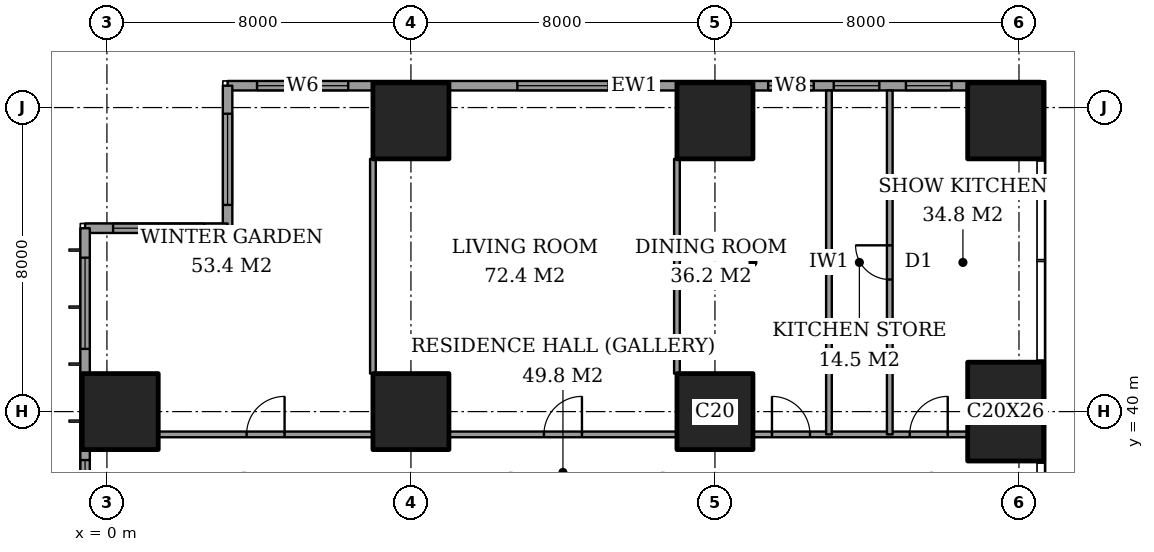
"""IFC4 building model, lengths in metres.
Left out: names, types, materials, properties, quantities, classifications, styles, units other than length and angle.
Written with IfcOpenShell. Run it as: python <this file> out.ifc"""

import sys

from ifc_helpers import new_model, si_unit, direction, frame, frame_2d, origin, origin_2d, place, context, subcontext, project, spatial, rectangle, extrude, element, fill, save


model = new_model("IFC4")
c1 = context("Model", 3, precision=1e-05, world=origin(), true_north=direction((0.0, 1.0)))
c2 = subcontext(c1, "Body", "Model", "MODEL_VIEW")
j1 = project(units=[si_unit("LENGTHUNIT", "METRE"), si_unit("PLANEANGLEUNIT", "RADIAN")], contexts=[c1])
p1 = place(None, origin())
s1 = spatial("IfcSite", under=j1, at=p1, CompositionType="ELEMENT")
p2 = place(p1, origin())
s2 = spatial("IfcBuilding", under=s1, at=p2, CompositionType="ELEMENT")
p3 = place(p2, frame((0.0, 0.0, 87.2)))
s3 = spatial("IfcBuildingStorey", under=s2, at=p3, CompositionType="ELEMENT", Elevation=87.2)
for number, where, z_axis, x_axis in (
    (1, (0.35, 40.0, 0.0), (0.0, 0.0, 1.0), (1.0, 0.0, 0.0)),
    (2, (8.0, 40.0, 0.0), (0.0, 0.0, 1.0), (1.0, 0.0, 0.0)),
    (3, (8.0, 47.65, 0.0), (0.0, 0.0, 1.0), (1.0, 0.0, 0.0)),
    (4, (16.0, 40.0, 0.0), (0.0, 0.0, 1.0), (1.0, 0.0, 0.0)),
    (5, (16.0, 47.65, 0.0), (0.0, 0.0, 1.0), (1.0, 0.0, 0.0)),
):
    element("IfcColumn", number, at=place(p3, frame(where, z_axis=z_axis, x_axis=x_axis)), inside=s3, PredefinedType="COLUMN", context=c2, shape_type="SweptSolid", body=[
        extrude(rectangle(XDim=2.0, YDim=2.0, at=origin_2d()), origin(), (0.0, 0.0, 1.0), 3.6),
    ])
p4 = place(p3, frame((23.65, 40.0, 0.0), z_axis=(0.0, 0.0, 1.0), x_axis=(1.0, 0.0, 0.0)))
e6 = element("IfcColumn", 6, at=p4, inside=s3, PredefinedType="COLUMN", context=c2, shape_type="SweptSolid", body=[
    extrude(rectangle(XDim=2.0, YDim=2.6, at=origin_2d()), origin(), (0.0, 0.0, 1.0), 3.6),
])
p5 = place(p3, frame((23.65, 47.65, 0.0), z_axis=(0.0, 0.0, 1.0), x_axis=(1.0, 0.0, 0.0)))
e7 = element("IfcColumn", 7, at=p5, inside=s3, PredefinedType="COLUMN", context=c2, shape_type="SweptSolid", body=[
    extrude(rectangle(XDim=2.0, YDim=2.0, at=origin_2d()), origin(), (0.0, 0.0, 1.0), 3.6),
])
p6 = place(p3, frame((24.575, 48.575, 0.0), z_axis=(0.0, 0.0, 1.0), x_axis=(-1.0, 0.0, 0.0)))
e8 = element("IfcWall", 8, at=p6, inside=s3, PredefinedType="SOLIDWALL", context=c2, shape_type="SweptSolid", body=[
    extrude(rectangle(XDim=21.4, YDim=0.25, at=frame_2d((10.7, 0.0))), origin(), (0.0, 0.0, 1.0), 3.6),
])
p7 = place(p6, frame((2.35, 0.0, 0.6)))
e9 = element("IfcOpeningElement", 9, at=p7, cuts=e8, PredefinedType="OPENING", context=c2, shape_type="SweptSolid", body=[
    extrude(rectangle(XDim=1.2, YDim=2.0, at=frame_2d((0.6, 1.0))), frame((0.0, 0.135, 0.0), z_axis=(0.0, -1.0, 0.0), x_axis=(1.0, 0.0, 0.0)), (0.0, 0.0, 1.0), 0.27),
])
p8 = place(p6, frame((4.25, 0.0, 0.6)))
e10 = element("IfcOpeningElement", 10, at=p8, cuts=e8, PredefinedType="OPENING", context=c2, shape_type="SweptSolid", body=[
    extrude(rectangle(XDim=1.2, YDim=2.0, at=frame_2d((0.6, 1.0))), frame((0.0, 0.135, 0.0), z_axis=(0.0, -1.0, 0.0), x_axis=(1.0, 0.0, 0.0)), (0.0, 0.0, 1.0), 0.27),
])
p9 = place(p6, frame((5.975, 0.0, 0.6)))
e11 = element("IfcOpeningElement", 11, at=p9, cuts=e8, PredefinedType="OPENING", context=c2, shape_type="SweptSolid", body=[
    extrude(rectangle(XDim=1.2, YDim=2.0, at=frame_2d((0.6, 1.0))), frame((0.0, 0.135, 0.0), z_axis=(0.0, -1.0, 0.0), x_axis=(1.0, 0.0, 0.0)), (0.0, 0.0, 1.0), 0.27),
])
p10 = place(p6, frame((11.375, 0.0, 0.6)))
e12 = element("IfcOpeningElement", 12, at=p10, cuts=e8, PredefinedType="OPENING", context=c2, shape_type="SweptSolid", body=[
    extrude(rectangle(XDim=2.4, YDim=2.0, at=frame_2d((1.2, 1.0))), frame((0.0, 0.135, 0.0), z_axis=(0.0, -1.0, 0.0), x_axis=(1.0, 0.0, 0.0)), (0.0, 0.0, 1.0), 0.27),
])
p11 = place(p6, frame((18.225, 0.0, 0.6)))
e13 = element("IfcOpeningElement", 13, at=p11, cuts=e8, PredefinedType="OPENING", context=c2, shape_type="SweptSolid", body=[
    extrude(rectangle(XDim=2.4, YDim=2.0, at=frame_2d((1.2, 1.0))), frame((0.0, 0.135, 0.0), z_axis=(0.0, -1.0, 0.0), x_axis=(1.0, 0.0, 0.0)), (0.0, 0.0, 1.0), 0.27),
])
p12 = place(p3, frame((3.175, 48.575, 0.0), z_axis=(0.0, 0.0, 1.0), x_axis=(0.0, -1.0, 0.0)))
e14 = element("IfcWall", 14, at=p12, inside=s3, PredefinedType="SOLIDWALL", context=c2, shape_type="SweptSolid", body=[
    extrude(rectangle(XDim=3.75, YDim=0.25, at=frame_2d((1.875, 0.0))), origin(), (0.0, 0.0, 1.0), 3.6),
])
p13 = place(p12, frame((0.738, 0.0, 0.6)))
e15 = element("IfcOpeningElement", 15, at=p13, cuts=e14, PredefinedType="OPENING", context=c2, shape_type="SweptSolid", body=[
    extrude(rectangle(XDim=2.4, YDim=2.0, at=frame_2d((1.2, 1.0))), frame((0.0, 0.135, 0.0), z_axis=(0.0, -1.0, 0.0), x_axis=(1.0, 0.0, 0.0)), (0.0, 0.0, 1.0), 0.27),
])
p14 = place(p3, frame((3.175, 44.825, 0.0), z_axis=(0.0, 0.0, 1.0), x_axis=(-1.0, 0.0, 0.0)))
e16 = element("IfcWall", 16, at=p14, inside=s3, PredefinedType="SOLIDWALL", context=c2, shape_type="SweptSolid", body=[
    extrude(rectangle(XDim=3.75, YDim=0.25, at=frame_2d((1.875, 0.0))), origin(), (0.0, 0.0, 1.0), 3.6),
])
p15 = place(p14, frame((0.613, 0.0, 0.6)))
e17 = element("IfcOpeningElement", 17, at=p15, cuts=e16, PredefinedType="OPENING", context=c2, shape_type="SweptSolid", body=[
    extrude(rectangle(XDim=2.4, YDim=2.0, at=frame_2d((1.2, 1.0))), frame((0.0, 0.135, 0.0), z_axis=(0.0, -1.0, 0.0), x_axis=(1.0, 0.0, 0.0)), (0.0, 0.0, 1.0), 0.27),
])
p16 = place(p3, frame((-0.575, 44.825, 0.0), z_axis=(0.0, 0.0, 1.0), x_axis=(0.0, -1.0, 0.0)))
e18 = element("IfcWall", 18, at=p16, inside=s3, PredefinedType="SOLIDWALL", context=c2, shape_type="SweptSolid", body=[
    extrude(rectangle(XDim=41.65, YDim=0.25, at=frame_2d((20.825, 0.0))), origin(), (0.0, 0.0, 1.0), 3.6),
])
p17 = place(p16, frame((0.775, 0.0, 0.6)))
e19 = element("IfcOpeningElement", 19, at=p17, cuts=e18, PredefinedType="OPENING", context=c2, shape_type="SweptSolid", body=[
    extrude(rectangle(XDim=2.4, YDim=2.0, at=frame_2d((1.2, 1.0))), frame((0.0, 0.135, 0.0), z_axis=(0.0, -1.0, 0.0), x_axis=(1.0, 0.0, 0.0)), (0.0, 0.0, 1.0), 0.27),
])
p18 = place(p16, frame((6.1, 0.0, 0.6)))
e20 = element("IfcOpeningElement", 20, at=p18, cuts=e18, PredefinedType="OPENING", context=c2, shape_type="SweptSolid", body=[
    extrude(rectangle(XDim=1.2, YDim=2.0, at=frame_2d((0.6, 1.0))), frame((0.0, 0.135, 0.0), z_axis=(0.0, -1.0, 0.0), x_axis=(1.0, 0.0, 0.0)), (0.0, 0.0, 1.0), 0.27),
])
p19 = place(p16, frame((8.425, 0.0, 0.6)))
e21 = element("IfcOpeningElement", 21, at=p19, cuts=e18, PredefinedType="OPENING", context=c2, shape_type="SweptSolid", body=[
    extrude(rectangle(XDim=2.4, YDim=2.0, at=frame_2d((1.2, 1.0))), frame((0.0, 0.135, 0.0), z_axis=(0.0, -1.0, 0.0), x_axis=(1.0, 0.0, 0.0)), (0.0, 0.0, 1.0), 0.27),
])
p20 = place(p16, frame((15.625, 0.0, 0.6)))
e22 = element("IfcOpeningElement", 22, at=p20, cuts=e18, PredefinedType="OPENING", context=c2, shape_type="SweptSolid", body=[
    extrude(rectangle(XDim=2.4, YDim=2.0, at=frame_2d((1.2, 1.0))), frame((0.0, 0.135, 0.0), z_axis=(0.0, -1.0, 0.0), x_axis=(1.0, 0.0, 0.0)), (0.0, 0.0, 1.0), 0.27),
])
p21 = place(p16, frame((23.625, 0.0, 0.6)))
e23 = element("IfcOpeningElement", 23, at=p21, cuts=e18, PredefinedType="OPENING", context=c2, shape_type="SweptSolid", body=[
    extrude(rectangle(XDim=2.4, YDim=2.0, at=frame_2d((1.2, 1.0))), frame((0.0, 0.135, 0.0), z_axis=(0.0, -1.0, 0.0), x_axis=(1.0, 0.0, 0.0)), (0.0, 0.0, 1.0), 0.27),
])
p22 = place(p16, frame((30.825, 0.0, 0.6)))
e24 = element("IfcOpeningElement", 24, at=p22, cuts=e18, PredefinedType="OPENING", context=c2, shape_type="SweptSolid", body=[
    extrude(rectangle(XDim=2.4, YDim=2.0, at=frame_2d((1.2, 1.0))), frame((0.0, 0.135, 0.0), z_axis=(0.0, -1.0, 0.0), x_axis=(1.0, 0.0, 0.0)), (0.0, 0.0, 1.0), 0.27),
])
p23 = place(p16, frame((34.5, 0.0, 0.6)))
e25 = element("IfcOpeningElement", 25, at=p23, cuts=e18, PredefinedType="OPENING", context=c2, shape_type="SweptSolid", body=[
    extrude(rectangle(XDim=1.2, YDim=2.0, at=frame_2d((0.6, 1.0))), frame((0.0, 0.135, 0.0), z_axis=(0.0, -1.0, 0.0), x_axis=(1.0, 0.0, 0.0)), (0.0, 0.0, 1.0), 0.27),
])
p24 = place(p16, frame((38.475, 0.0, 0.6)))
e26 = element("IfcOpeningElement", 26, at=p24, cuts=e18, PredefinedType="OPENING", context=c2, shape_type="SweptSolid", body=[
    extrude(rectangle(XDim=2.4, YDim=2.0, at=frame_2d((1.2, 1.0))), frame((0.0, 0.135, 0.0), z_axis=(0.0, -1.0, 0.0), x_axis=(1.0, 0.0, 0.0)), (0.0, 0.0, 1.0), 0.27),
])
p25 = place(p3, frame((1.35, 39.4, 0.0), z_axis=(0.0, 0.0, 1.0), x_axis=(1.0, 0.0, 0.0)))
e27 = element("IfcWall", 27, at=p25, inside=s3, PredefinedType="PARTITIONING", context=c2, shape_type="SweptSolid", body=[
    extrude(rectangle(XDim=5.65, YDim=0.15, at=frame_2d((2.825, 0.0))), origin(), (0.0, 0.0, 1.0), 3.25),
])
p26 = place(p25, frame((2.325, 0.0, 0.0)))
e28 = element("IfcOpeningElement", 28, at=p26, cuts=e27, PredefinedType="OPENING", context=c2, shape_type="SweptSolid", body=[
    extrude(rectangle(XDim=1.0, YDim=2.1, at=frame_2d((0.5, 1.05))), frame((0.0, 0.085, 0.0), z_axis=(0.0, -1.0, 0.0), x_axis=(1.0, 0.0, 0.0)), (0.0, 0.0, 1.0), 0.17),
])
p27 = place(p3, frame((9.0, 39.4, 0.0), z_axis=(0.0, 0.0, 1.0), x_axis=(1.0, 0.0, 0.0)))
e29 = element("IfcWall", 29, at=p27, inside=s3, PredefinedType="PARTITIONING", context=c2, shape_type="SweptSolid", body=[
    extrude(rectangle(XDim=6.0, YDim=0.15, at=frame_2d((3.0, 0.0))), origin(), (0.0, 0.0, 1.0), 3.25),
])
p28 = place(p27, frame((2.5, 0.0, 0.0)))
e30 = element("IfcOpeningElement", 30, at=p28, cuts=e29, PredefinedType="OPENING", context=c2, shape_type="SweptSolid", body=[
    extrude(rectangle(XDim=1.0, YDim=2.1, at=frame_2d((0.5, 1.05))), frame((0.0, 0.085, 0.0), z_axis=(0.0, -1.0, 0.0), x_axis=(1.0, 0.0, 0.0)), (0.0, 0.0, 1.0), 0.17),
])
p29 = place(p3, frame((17.0, 39.4, 0.0), z_axis=(0.0, 0.0, 1.0), x_axis=(1.0, 0.0, 0.0)))
e31 = element("IfcWall", 31, at=p29, inside=s3, PredefinedType="PARTITIONING", context=c2, shape_type="SweptSolid", body=[
    extrude(rectangle(XDim=5.65, YDim=0.15, at=frame_2d((2.825, 0.0))), origin(), (0.0, 0.0, 1.0), 3.25),
])
p30 = place(p29, frame((0.5, 0.0, 0.0)))
e32 = element("IfcOpeningElement", 32, at=p30, cuts=e31, PredefinedType="OPENING", context=c2, shape_type="SweptSolid", body=[
    extrude(rectangle(XDim=1.0, YDim=2.1, at=frame_2d((0.5, 1.05))), frame((0.0, 0.085, 0.0), z_axis=(0.0, -1.0, 0.0), x_axis=(1.0, 0.0, 0.0)), (0.0, 0.0, 1.0), 0.17),
])
p31 = place(p29, frame((4.125, 0.0, 0.0)))
e33 = element("IfcOpeningElement", 33, at=p31, cuts=e31, PredefinedType="OPENING", context=c2, shape_type="SweptSolid", body=[
    extrude(rectangle(XDim=1.0, YDim=2.1, at=frame_2d((0.5, 1.05))), frame((0.0, 0.085, 0.0), z_axis=(0.0, -1.0, 0.0), x_axis=(1.0, 0.0, 0.0)), (0.0, 0.0, 1.0), 0.17),
])
for number, where, z_axis, x_axis in (
    (34, (7.0, 41.0, 0.0), (0.0, 0.0, 1.0), (0.0, 1.0, 0.0)),
    (35, (15.0, 41.0, 0.0), (0.0, 0.0, 1.0), (0.0, 1.0, 0.0)),
):
    element("IfcWall", number, at=place(p3, frame(where, z_axis=z_axis, x_axis=x_axis)), inside=s3, PredefinedType="PARTITIONING", context=c2, shape_type="SweptSolid", body=[
        extrude(rectangle(XDim=5.65, YDim=0.15, at=frame_2d((2.825, 0.0))), origin(), (0.0, 0.0, 1.0), 3.25),
    ])
p32 = place(p3, frame((19.0, 39.4, 0.0), z_axis=(0.0, 0.0, 1.0), x_axis=(0.0, 1.0, 0.0)))
e36 = element("IfcWall", 36, at=p32, inside=s3, PredefinedType="PARTITIONING", context=c2, shape_type="SweptSolid", body=[
    extrude(rectangle(XDim=9.05, YDim=0.15, at=frame_2d((4.525, 0.0))), origin(), (0.0, 0.0, 1.0), 3.25),
])
p33 = place(p3, frame((20.6, 39.4, 0.0), z_axis=(0.0, 0.0, 1.0), x_axis=(0.0, 1.0, 0.0)))
e37 = element("IfcWall", 37, at=p33, inside=s3, PredefinedType="PARTITIONING", context=c2, shape_type="SweptSolid", body=[
    extrude(rectangle(XDim=9.05, YDim=0.15, at=frame_2d((4.525, 0.0))), origin(), (0.0, 0.0, 1.0), 3.25),
])
p34 = place(p33, frame((4.075, 0.0, 0.0)))
e38 = element("IfcOpeningElement", 38, at=p34, cuts=e37, PredefinedType="OPENING", context=c2, shape_type="SweptSolid", body=[
    extrude(rectangle(XDim=0.9, YDim=2.1, at=frame_2d((0.45, 1.05))), frame((0.0, 0.085, 0.0), z_axis=(0.0, -1.0, 0.0), x_axis=(1.0, 0.0, 0.0)), (0.0, 0.0, 1.0), 0.17),
])
p35 = place(p7, origin())
e39 = element("IfcWindow", 39, at=p35, inside=s3, PartitioningType="SINGLE_PANEL", PredefinedType="WINDOW", context=c2, shape_type="SweptSolid", body=[
    extrude(rectangle(XDim=1.2, YDim=2.0, at=frame_2d((0.6, 1.0))), frame((0.0, 0.03, 0.0), z_axis=(0.0, -1.0, 0.0), x_axis=(1.0, 0.0, 0.0)), (0.0, 0.0, 1.0), 0.06),
])
fill(e9, e39)
p36 = place(p8, origin())
e40 = element("IfcWindow", 40, at=p36, inside=s3, PartitioningType="SINGLE_PANEL", PredefinedType="WINDOW", context=c2, shape_type="SweptSolid", body=[
    extrude(rectangle(XDim=1.2, YDim=2.0, at=frame_2d((0.6, 1.0))), frame((0.0, 0.03, 0.0), z_axis=(0.0, -1.0, 0.0), x_axis=(1.0, 0.0, 0.0)), (0.0, 0.0, 1.0), 0.06),
])
fill(e10, e40)
p37 = place(p9, origin())
e41 = element("IfcWindow", 41, at=p37, inside=s3, PartitioningType="SINGLE_PANEL", PredefinedType="WINDOW", context=c2, shape_type="SweptSolid", body=[
    extrude(rectangle(XDim=1.2, YDim=2.0, at=frame_2d((0.6, 1.0))), frame((0.0, 0.03, 0.0), z_axis=(0.0, -1.0, 0.0), x_axis=(1.0, 0.0, 0.0)), (0.0, 0.0, 1.0), 0.06),
])
fill(e11, e41)
p38 = place(p10, origin())
e42 = element("IfcWindow", 42, at=p38, inside=s3, PartitioningType="SINGLE_PANEL", PredefinedType="WINDOW", context=c2, shape_type="SweptSolid", body=[
    extrude(rectangle(XDim=2.4, YDim=2.0, at=frame_2d((1.2, 1.0))), frame((0.0, 0.03, 0.0), z_axis=(0.0, -1.0, 0.0), x_axis=(1.0, 0.0, 0.0)), (0.0, 0.0, 1.0), 0.06),
])
fill(e12, e42)
p39 = place(p11, origin())
e43 = element("IfcWindow", 43, at=p39, inside=s3, PartitioningType="SINGLE_PANEL", PredefinedType="WINDOW", context=c2, shape_type="SweptSolid", body=[
    extrude(rectangle(XDim=2.4, YDim=2.0, at=frame_2d((1.2, 1.0))), frame((0.0, 0.03, 0.0), z_axis=(0.0, -1.0, 0.0), x_axis=(1.0, 0.0, 0.0)), (0.0, 0.0, 1.0), 0.06),
])
fill(e13, e43)
p40 = place(p13, origin())
e44 = element("IfcWindow", 44, at=p40, inside=s3, PartitioningType="SINGLE_PANEL", PredefinedType="WINDOW", context=c2, shape_type="SweptSolid", body=[
    extrude(rectangle(XDim=2.4, YDim=2.0, at=frame_2d((1.2, 1.0))), frame((0.0, 0.03, 0.0), z_axis=(0.0, -1.0, 0.0), x_axis=(1.0, 0.0, 0.0)), (0.0, 0.0, 1.0), 0.06),
])
fill(e15, e44)
p41 = place(p15, origin())
e45 = element("IfcWindow", 45, at=p41, inside=s3, PartitioningType="SINGLE_PANEL", PredefinedType="WINDOW", context=c2, shape_type="SweptSolid", body=[
    extrude(rectangle(XDim=2.4, YDim=2.0, at=frame_2d((1.2, 1.0))), frame((0.0, 0.03, 0.0), z_axis=(0.0, -1.0, 0.0), x_axis=(1.0, 0.0, 0.0)), (0.0, 0.0, 1.0), 0.06),
])
fill(e17, e45)
p42 = place(p17, origin())
e46 = element("IfcWindow", 46, at=p42, inside=s3, PartitioningType="SINGLE_PANEL", PredefinedType="WINDOW", context=c2, shape_type="SweptSolid", body=[
    extrude(rectangle(XDim=2.4, YDim=2.0, at=frame_2d((1.2, 1.0))), frame((0.0, 0.03, 0.0), z_axis=(0.0, -1.0, 0.0), x_axis=(1.0, 0.0, 0.0)), (0.0, 0.0, 1.0), 0.06),
])
fill(e19, e46)
p43 = place(p18, origin())
e47 = element("IfcWindow", 47, at=p43, inside=s3, PartitioningType="SINGLE_PANEL", PredefinedType="WINDOW", context=c2, shape_type="SweptSolid", body=[
    extrude(rectangle(XDim=1.2, YDim=2.0, at=frame_2d((0.6, 1.0))), frame((0.0, 0.03, 0.0), z_axis=(0.0, -1.0, 0.0), x_axis=(1.0, 0.0, 0.0)), (0.0, 0.0, 1.0), 0.06),
])
fill(e20, e47)
p44 = place(p26, origin())
e48 = element("IfcDoor", 48, at=p44, inside=s3, OperationType="SINGLE_SWING_LEFT", PredefinedType="DOOR", context=c2, shape_type="SweptSolid", body=[
    extrude(rectangle(XDim=1.0, YDim=2.1, at=frame_2d((0.5, 1.05))), frame((0.0, 0.025, 0.0), z_axis=(0.0, -1.0, 0.0), x_axis=(1.0, 0.0, 0.0)), (0.0, 0.0, 1.0), 0.05),
])
fill(e28, e48)
p45 = place(p28, origin())
e49 = element("IfcDoor", 49, at=p45, inside=s3, OperationType="SINGLE_SWING_LEFT", PredefinedType="DOOR", context=c2, shape_type="SweptSolid", body=[
    extrude(rectangle(XDim=1.0, YDim=2.1, at=frame_2d((0.5, 1.05))), frame((0.0, 0.025, 0.0), z_axis=(0.0, -1.0, 0.0), x_axis=(1.0, 0.0, 0.0)), (0.0, 0.0, 1.0), 0.05),
])
fill(e30, e49)
p46 = place(p30, origin())
e50 = element("IfcDoor", 50, at=p46, inside=s3, OperationType="SINGLE_SWING_RIGHT", PredefinedType="DOOR", context=c2, shape_type="SweptSolid", body=[
    extrude(rectangle(XDim=1.0, YDim=2.1, at=frame_2d((0.5, 1.05))), frame((0.0, 0.025, 0.0), z_axis=(0.0, -1.0, 0.0), x_axis=(1.0, 0.0, 0.0)), (0.0, 0.0, 1.0), 0.05),
])
fill(e32, e50)
p47 = place(p34, origin())
e51 = element("IfcDoor", 51, at=p47, inside=s3, OperationType="SINGLE_SWING_LEFT", PredefinedType="DOOR", context=c2, shape_type="SweptSolid", body=[
    extrude(rectangle(XDim=0.9, YDim=2.1, at=frame_2d((0.45, 1.05))), frame((0.0, 0.025, 0.0), z_axis=(0.0, -1.0, 0.0), x_axis=(1.0, 0.0, 0.0)), (0.0, 0.0, 1.0), 0.05),
])
fill(e38, e51)
p48 = place(p31, origin())
e52 = element("IfcDoor", 52, at=p48, inside=s3, OperationType="SINGLE_SWING_LEFT", PredefinedType="DOOR", context=c2, shape_type="SweptSolid", body=[
    extrude(rectangle(XDim=1.0, YDim=2.1, at=frame_2d((0.5, 1.05))), frame((0.0, 0.025, 0.0), z_axis=(0.0, -1.0, 0.0), x_axis=(1.0, 0.0, 0.0)), (0.0, 0.0, 1.0), 0.05),
])
fill(e33, e52)
save(model, sys.argv[1])
